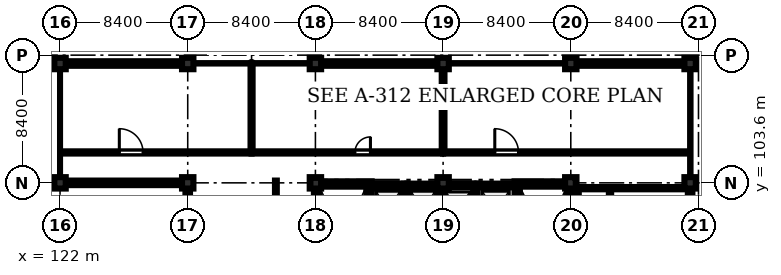
"""IFC4 building model, lengths in metres.
Left out: names, types, materials, properties, quantities, classifications, styles, units other than length and angle.
Written with IfcOpenShell. Run it as: python <this file> out.ifc"""

import sys

from ifc_helpers import new_model, si_unit, direction, frame, frame_2d, origin, origin_2d, place, context, subcontext, project, spatial, rectangle, extrude, element, fill, save


model = new_model("IFC4")
c1 = context("Model", 3, precision=1e-05, world=origin(), true_north=direction((0.0, 1.0)))
c2 = subcontext(c1, "Body", "Model", "MODEL_VIEW")
j1 = project(units=[si_unit("LENGTHUNIT", "METRE"), si_unit("PLANEANGLEUNIT", "RADIAN")], contexts=[c1])
p1 = place(None, origin())
s1 = spatial("IfcSite", under=j1, at=p1, CompositionType="ELEMENT")
p2 = place(p1, origin())
s2 = spatial("IfcBuilding", under=s1, at=p2, CompositionType="ELEMENT")
p3 = place(p2, frame((0.0, 0.0, 40.2)))
s3 = spatial("IfcBuildingStorey", under=s2, at=p3, CompositionType="ELEMENT", Elevation=40.2)
for number, where, z_axis, x_axis in (
    (1, (122.0, 103.6, 0.0), (0.0, 0.0, 1.0), (1.0, 0.0, 0.0)),
    (2, (122.0, 111.45, 0.0), (0.0, 0.0, 1.0), (1.0, 0.0, 0.0)),
    (3, (130.4, 103.6, 0.0), (0.0, 0.0, 1.0), (1.0, 0.0, 0.0)),
    (4, (130.4, 111.45, 0.0), (0.0, 0.0, 1.0), (1.0, 0.0, 0.0)),
    (5, (138.8, 103.6, 0.0), (0.0, 0.0, 1.0), (1.0, 0.0, 0.0)),
    (6, (138.8, 111.45, 0.0), (0.0, 0.0, 1.0), (1.0, 0.0, 0.0)),
    (7, (147.2, 103.6, 0.0), (0.0, 0.0, 1.0), (1.0, 0.0, 0.0)),
    (8, (147.2, 111.45, 0.0), (0.0, 0.0, 1.0), (1.0, 0.0, 0.0)),
    (9, (155.6, 103.6, 0.0), (0.0, 0.0, 1.0), (1.0, 0.0, 0.0)),
    (10, (155.6, 111.45, 0.0), (0.0, 0.0, 1.0), (1.0, 0.0, 0.0)),
    (11, (163.45, 103.6, 0.0), (0.0, 0.0, 1.0), (1.0, 0.0, 0.0)),
    (12, (163.45, 111.45, 0.0), (0.0, 0.0, 1.0), (1.0, 0.0, 0.0)),
):
    element("IfcColumn", number, at=place(p3, frame(where, z_axis=z_axis, x_axis=x_axis)), inside=s3, PredefinedType="COLUMN", context=c2, shape_type="SweptSolid", body=[
        extrude(rectangle(XDim=0.75, YDim=0.75, at=origin_2d()), origin(), (0.0, 0.0, 1.0), 4.0),
    ])
p4 = place(p3, frame((138.7, 103.525, 0.0), z_axis=(0.0, 0.0, 1.0), x_axis=(1.0, 0.0, 0.0)))
e13 = element("IfcWall", 13, at=p4, inside=s3, PredefinedType="SHEAR", context=c2, shape_type="SweptSolid", body=[
    extrude(rectangle(XDim=3.8, YDim=0.35, at=frame_2d((1.9, 0.0))), origin(), (0.0, 0.0, 1.0), 4.0),
])
p5 = place(p3, frame((138.875, 95.45, 0.0), z_axis=(0.0, 0.0, 1.0), x_axis=(0.0, 1.0, 0.0)))
e14 = element("IfcWall", 14, at=p5, inside=s3, PredefinedType="SHEAR", context=c2, shape_type="SweptSolid", body=[
    extrude(rectangle(XDim=7.9, YDim=0.35, at=frame_2d((3.95, 0.0))), origin(), (0.0, 0.0, 1.0), 4.0),
])
p6 = place(p3, frame((142.325, 95.45, 0.0), z_axis=(0.0, 0.0, 1.0), x_axis=(0.0, 1.0, 0.0)))
e15 = element("IfcWall", 15, at=p6, inside=s3, PredefinedType="SHEAR", context=c2, shape_type="SweptSolid", body=[
    extrude(rectangle(XDim=7.9, YDim=0.35, at=frame_2d((3.95, 0.0))), origin(), (0.0, 0.0, 1.0), 4.0),
])
p7 = place(p6, frame((0.22, 0.0, 0.0)))
e16 = element("IfcOpeningElement", 16, at=p7, cuts=e15, PredefinedType="OPENING", context=c2, shape_type="SweptSolid", body=[
    extrude(rectangle(XDim=1.15, YDim=2.15, at=frame_2d((0.575, 1.075))), frame((0.0, 0.185, 0.0), z_axis=(0.0, -1.0, 0.0), x_axis=(1.0, 0.0, 0.0)), (0.0, 0.0, 1.0), 0.37),
])
p8 = place(p3, frame((151.9, 103.525, 0.0), z_axis=(0.0, 0.0, 1.0), x_axis=(1.0, 0.0, 0.0)))
e17 = element("IfcWall", 17, at=p8, inside=s3, PredefinedType="SHEAR", context=c2, shape_type="SweptSolid", body=[
    extrude(rectangle(XDim=3.8, YDim=0.35, at=frame_2d((1.9, 0.0))), origin(), (0.0, 0.0, 1.0), 4.0),
])
p9 = place(p3, frame((152.075, 95.45, 0.0), z_axis=(0.0, 0.0, 1.0), x_axis=(0.0, 1.0, 0.0)))
e18 = element("IfcWall", 18, at=p9, inside=s3, PredefinedType="SHEAR", context=c2, shape_type="SweptSolid", body=[
    extrude(rectangle(XDim=7.9, YDim=0.35, at=frame_2d((3.95, 0.0))), origin(), (0.0, 0.0, 1.0), 4.0),
])
p10 = place(p9, frame((0.35, 0.0, 0.0)))
e19 = element("IfcOpeningElement", 19, at=p10, cuts=e18, PredefinedType="OPENING", context=c2, shape_type="SweptSolid", body=[
    extrude(rectangle(XDim=1.15, YDim=2.15, at=frame_2d((0.575, 1.075))), frame((0.0, 0.185, 0.0), z_axis=(0.0, -1.0, 0.0), x_axis=(1.0, 0.0, 0.0)), (0.0, 0.0, 1.0), 0.37),
])
p11 = place(p3, frame((155.525, 95.45, 0.0), z_axis=(0.0, 0.0, 1.0), x_axis=(0.0, 1.0, 0.0)))
e20 = element("IfcWall", 20, at=p11, inside=s3, PredefinedType="SHEAR", context=c2, shape_type="SweptSolid", body=[
    extrude(rectangle(XDim=7.9, YDim=0.35, at=frame_2d((3.95, 0.0))), origin(), (0.0, 0.0, 1.0), 4.0),
])
p12 = place(p3, frame((142.5, 103.425, 0.0), z_axis=(0.0, 0.0, 1.0), x_axis=(1.0, 0.0, 0.0)))
e21 = element("IfcWall", 21, at=p12, inside=s3, PredefinedType="SHEAR", context=c2, shape_type="SweptSolid", body=[
    extrude(rectangle(XDim=2.1, YDim=0.25, at=frame_2d((1.05, 0.0))), origin(), (0.0, 0.0, 1.0), 4.0),
])
p13 = place(p3, frame((144.725, 100.15, 0.0), z_axis=(0.0, 0.0, 1.0), x_axis=(0.0, 1.0, 0.0)))
e22 = element("IfcWall", 22, at=p13, inside=s3, PredefinedType="SHEAR", context=c2, shape_type="SweptSolid", body=[
    extrude(rectangle(XDim=3.4, YDim=0.25, at=frame_2d((1.7, 0.0))), origin(), (0.0, 0.0, 1.0), 4.0),
])
p14 = place(p3, frame((144.85, 103.425, 0.0), z_axis=(0.0, 0.0, 1.0), x_axis=(1.0, 0.0, 0.0)))
e23 = element("IfcWall", 23, at=p14, inside=s3, PredefinedType="SHEAR", context=c2, shape_type="SweptSolid", body=[
    extrude(rectangle(XDim=2.05, YDim=0.25, at=frame_2d((1.025, 0.0))), origin(), (0.0, 0.0, 1.0), 4.0),
])
p15 = place(p3, frame((147.025, 100.15, 0.0), z_axis=(0.0, 0.0, 1.0), x_axis=(0.0, 1.0, 0.0)))
e24 = element("IfcWall", 24, at=p15, inside=s3, PredefinedType="SHEAR", context=c2, shape_type="SweptSolid", body=[
    extrude(rectangle(XDim=3.4, YDim=0.25, at=frame_2d((1.7, 0.0))), origin(), (0.0, 0.0, 1.0), 4.0),
])
p16 = place(p3, frame((147.15, 103.425, 0.0), z_axis=(0.0, 0.0, 1.0), x_axis=(1.0, 0.0, 0.0)))
e25 = element("IfcWall", 25, at=p16, inside=s3, PredefinedType="SHEAR", context=c2, shape_type="SweptSolid", body=[
    extrude(rectangle(XDim=2.05, YDim=0.25, at=frame_2d((1.025, 0.0))), origin(), (0.0, 0.0, 1.0), 4.0),
])
p17 = place(p3, frame((149.325, 100.35, 0.0), z_axis=(0.0, 0.0, 1.0), x_axis=(0.0, 1.0, 0.0)))
e26 = element("IfcWall", 26, at=p17, inside=s3, PredefinedType="SHEAR", context=c2, shape_type="SweptSolid", body=[
    extrude(rectangle(XDim=3.2, YDim=0.25, at=frame_2d((1.6, 0.0))), origin(), (0.0, 0.0, 1.0), 4.0),
])
p18 = place(p3, frame((149.45, 103.425, 0.0), z_axis=(0.0, 0.0, 1.0), x_axis=(1.0, 0.0, 0.0)))
e27 = element("IfcWall", 27, at=p18, inside=s3, PredefinedType="SHEAR", context=c2, shape_type="SweptSolid", body=[
    extrude(rectangle(XDim=2.45, YDim=0.25, at=frame_2d((1.225, 0.0))), origin(), (0.0, 0.0, 1.0), 4.0),
])
p19 = place(p3, frame((122.375, 111.45, 0.0), z_axis=(0.0, 0.0, 1.0), x_axis=(1.0, 0.0, 0.0)))
e28 = element("IfcWall", 28, at=p19, inside=s3, PredefinedType="STANDARD", context=c2, shape_type="SweptSolid", body=[
    extrude(rectangle(XDim=7.65, YDim=0.3, at=frame_2d((3.825, 0.0))), origin(), (0.0, 0.0, 1.0), 3.3),
])
p20 = place(p19, frame((0.85, 0.0, 0.9)))
e29 = element("IfcOpeningElement", 29, at=p20, cuts=e28, PredefinedType="OPENING", context=c2, shape_type="SweptSolid", body=[
    extrude(rectangle(XDim=1.8, YDim=2.1, at=frame_2d((0.9, 1.05))), frame((0.0, 0.16, 0.0), z_axis=(0.0, -1.0, 0.0), x_axis=(1.0, 0.0, 0.0)), (0.0, 0.0, 1.0), 0.32),
])
p21 = place(p19, frame((4.65, 0.0, 0.9)))
e30 = element("IfcOpeningElement", 30, at=p21, cuts=e28, PredefinedType="OPENING", context=c2, shape_type="SweptSolid", body=[
    extrude(rectangle(XDim=1.8, YDim=2.1, at=frame_2d((0.9, 1.05))), frame((0.0, 0.16, 0.0), z_axis=(0.0, -1.0, 0.0), x_axis=(1.0, 0.0, 0.0)), (0.0, 0.0, 1.0), 0.32),
])
p22 = place(p3, frame((139.175, 111.45, 0.0), z_axis=(0.0, 0.0, 1.0), x_axis=(1.0, 0.0, 0.0)))
e31 = element("IfcWall", 31, at=p22, inside=s3, PredefinedType="STANDARD", context=c2, shape_type="SweptSolid", body=[
    extrude(rectangle(XDim=7.65, YDim=0.3, at=frame_2d((3.825, 0.0))), origin(), (0.0, 0.0, 1.0), 3.3),
])
p23 = place(p22, frame((0.85, 0.0, 0.9)))
e32 = element("IfcOpeningElement", 32, at=p23, cuts=e31, PredefinedType="OPENING", context=c2, shape_type="SweptSolid", body=[
    extrude(rectangle(XDim=1.8, YDim=2.1, at=frame_2d((0.9, 1.05))), frame((0.0, 0.16, 0.0), z_axis=(0.0, -1.0, 0.0), x_axis=(1.0, 0.0, 0.0)), (0.0, 0.0, 1.0), 0.32),
])
p24 = place(p22, frame((4.65, 0.0, 0.9)))
e33 = element("IfcOpeningElement", 33, at=p24, cuts=e31, PredefinedType="OPENING", context=c2, shape_type="SweptSolid", body=[
    extrude(rectangle(XDim=1.8, YDim=2.1, at=frame_2d((0.9, 1.05))), frame((0.0, 0.16, 0.0), z_axis=(0.0, -1.0, 0.0), x_axis=(1.0, 0.0, 0.0)), (0.0, 0.0, 1.0), 0.32),
])
p25 = place(p3, frame((155.975, 111.45, 0.0), z_axis=(0.0, 0.0, 1.0), x_axis=(1.0, 0.0, 0.0)))
e34 = element("IfcWall", 34, at=p25, inside=s3, PredefinedType="STANDARD", context=c2, shape_type="SweptSolid", body=[
    extrude(rectangle(XDim=7.1, YDim=0.3, at=frame_2d((3.55, 0.0))), origin(), (0.0, 0.0, 1.0), 3.3),
])
p26 = place(p25, frame((0.85, 0.0, 0.9)))
e35 = element("IfcOpeningElement", 35, at=p26, cuts=e34, PredefinedType="OPENING", context=c2, shape_type="SweptSolid", body=[
    extrude(rectangle(XDim=1.8, YDim=2.1, at=frame_2d((0.9, 1.05))), frame((0.0, 0.16, 0.0), z_axis=(0.0, -1.0, 0.0), x_axis=(1.0, 0.0, 0.0)), (0.0, 0.0, 1.0), 0.32),
])
p27 = place(p25, frame((4.65, 0.0, 0.9)))
e36 = element("IfcOpeningElement", 36, at=p27, cuts=e34, PredefinedType="OPENING", context=c2, shape_type="SweptSolid", body=[
    extrude(rectangle(XDim=1.8, YDim=2.1, at=frame_2d((0.9, 1.05))), frame((0.0, 0.16, 0.0), z_axis=(0.0, -1.0, 0.0), x_axis=(1.0, 0.0, 0.0)), (0.0, 0.0, 1.0), 0.32),
])
p28 = place(p3, frame((163.45, 103.225, 0.0), z_axis=(0.0, 0.0, 1.0), x_axis=(0.0, -1.0, 0.0)))
e37 = element("IfcWall", 37, at=p28, inside=s3, PredefinedType="STANDARD", context=c2, shape_type="SweptSolid", body=[
    extrude(rectangle(XDim=7.65, YDim=0.3, at=frame_2d((3.825, 0.0))), origin(), (0.0, 0.0, 1.0), 3.3),
])
p29 = place(p28, frame((1.15, 0.0, 1.1)))
e38 = element("IfcOpeningElement", 38, at=p29, cuts=e37, PredefinedType="OPENING", context=c2, shape_type="SweptSolid", body=[
    extrude(rectangle(XDim=1.4, YDim=1.4, at=frame_2d((0.7, 0.7))), frame((0.0, 0.16, 0.0), z_axis=(0.0, -1.0, 0.0), x_axis=(1.0, 0.0, 0.0)), (0.0, 0.0, 1.0), 0.32),
])
p30 = place(p3, frame((130.4, 95.575, 0.0), z_axis=(0.0, 0.0, 1.0), x_axis=(0.0, 1.0, 0.0)))
e39 = element("IfcWall", 39, at=p30, inside=s3, PredefinedType="STANDARD", context=c2, shape_type="SweptSolid", body=[
    extrude(rectangle(XDim=7.65, YDim=0.3, at=frame_2d((3.825, 0.0))), origin(), (0.0, 0.0, 1.0), 3.3),
])
p31 = place(p30, frame((2.4, 0.0, 1.0)))
e40 = element("IfcOpeningElement", 40, at=p31, cuts=e39, PredefinedType="OPENING", context=c2, shape_type="SweptSolid", body=[
    extrude(rectangle(XDim=1.8, YDim=1.8, at=frame_2d((0.9, 0.9))), frame((0.0, 0.16, 0.0), z_axis=(0.0, -1.0, 0.0), x_axis=(1.0, 0.0, 0.0)), (0.0, 0.0, 1.0), 0.32),
])
p32 = place(p3, frame((130.025, 103.6, 0.0), z_axis=(0.0, 0.0, 1.0), x_axis=(-1.0, 0.0, 0.0)))
e41 = element("IfcWall", 41, at=p32, inside=s3, PredefinedType="STANDARD", context=c2, shape_type="SweptSolid", body=[
    extrude(rectangle(XDim=7.65, YDim=0.3, at=frame_2d((3.825, 0.0))), origin(), (0.0, 0.0, 1.0), 3.3),
])
p33 = place(p3, frame((158.18, 94.68, 0.0), z_axis=(0.0, 0.0, 1.0), x_axis=(0.0, 1.0, 0.0)))
e42 = element("IfcWall", 42, at=p33, inside=s3, PredefinedType="PARTITIONING", context=c2, shape_type="SweptSolid", body=[
    extrude(rectangle(XDim=8.57, YDim=0.15, at=frame_2d((4.285, 0.0))), origin(), (0.0, 0.0, 1.0), 4.0),
])
p34 = place(p33, frame((0.8, 0.0, 0.0)))
e43 = element("IfcOpeningElement", 43, at=p34, cuts=e42, PredefinedType="OPENING", context=c2, shape_type="SweptSolid", body=[
    extrude(rectangle(XDim=1.0, YDim=2.12, at=frame_2d((0.5, 1.06))), frame((0.0, 0.085, 0.0), z_axis=(0.0, -1.0, 0.0), x_axis=(1.0, 0.0, 0.0)), (0.0, 0.0, 1.0), 0.17),
])
p35 = place(p33, frame((3.5, 0.0, 0.0)))
e44 = element("IfcOpeningElement", 44, at=p35, cuts=e42, PredefinedType="OPENING", context=c2, shape_type="SweptSolid", body=[
    extrude(rectangle(XDim=0.92, YDim=2.1, at=frame_2d((0.46, 1.05))), frame((0.0, 0.085, 0.0), z_axis=(0.0, -1.0, 0.0), x_axis=(1.0, 0.0, 0.0)), (0.0, 0.0, 1.0), 0.17),
])
p36 = place(p33, frame((6.4, 0.0, 0.0)))
e45 = element("IfcOpeningElement", 45, at=p36, cuts=e42, PredefinedType="OPENING", context=c2, shape_type="SweptSolid", body=[
    extrude(rectangle(XDim=0.92, YDim=2.1, at=frame_2d((0.46, 1.05))), frame((0.0, 0.085, 0.0), z_axis=(0.0, -1.0, 0.0), x_axis=(1.0, 0.0, 0.0)), (0.0, 0.0, 1.0), 0.17),
])
p37 = place(p3, frame((156.05, 103.25, 0.0), z_axis=(0.0, 0.0, 1.0), x_axis=(1.0, 0.0, 0.0)))
e46 = element("IfcWall", 46, at=p37, inside=s3, PredefinedType="PARTITIONING", context=c2, shape_type="SweptSolid", body=[
    extrude(rectangle(XDim=7.15, YDim=0.15, at=frame_2d((3.575, 0.0))), origin(), (0.0, 0.0, 1.0), 4.0),
])
p38 = place(p3, frame((156.05, 94.68, 0.0), z_axis=(0.0, 0.0, 1.0), x_axis=(0.0, 1.0, 0.0)))
e47 = element("IfcWall", 47, at=p38, inside=s3, PredefinedType="PARTITIONING", context=c2, shape_type="SweptSolid", body=[
    extrude(rectangle(XDim=8.57, YDim=0.15, at=frame_2d((4.285, 0.0))), origin(), (0.0, 0.0, 1.0), 4.0),
])
p39 = place(p3, frame((136.2, 94.68, 0.0), z_axis=(0.0, 0.0, 1.0), x_axis=(0.0, 1.0, 0.0)))
e48 = element("IfcWall", 48, at=p39, inside=s3, PredefinedType="PARTITIONING", context=c2, shape_type="SweptSolid", body=[
    extrude(rectangle(XDim=9.07, YDim=0.12, at=frame_2d((4.535, 0.0))), origin(), (0.0, 0.0, 1.0), 4.0),
])
p40 = place(p3, frame((122.15, 105.6, 0.0), z_axis=(0.0, 0.0, 1.0), x_axis=(1.0, 0.0, 0.0)))
e49 = element("IfcWall", 49, at=p40, inside=s3, PredefinedType="PARTITIONING", context=c2, shape_type="SweptSolid", body=[
    extrude(rectangle(XDim=12.45, YDim=0.145, at=frame_2d((6.225, 0.0))), origin(), (0.0, 0.0, 1.0), 4.0),
])
p41 = place(p40, frame((3.75, 0.0, 0.0)))
e50 = element("IfcOpeningElement", 50, at=p41, cuts=e49, PredefinedType="OPENING", context=c2, shape_type="SweptSolid", body=[
    extrude(rectangle(XDim=1.56, YDim=2.22, at=frame_2d((0.78, 1.11))), frame((0.0, 0.083, 0.0), z_axis=(0.0, -1.0, 0.0), x_axis=(1.0, 0.0, 0.0)), (0.0, 0.0, 1.0), 0.165),
])
p42 = place(p3, frame((134.6, 105.6, 0.0), z_axis=(0.0, 0.0, 1.0), x_axis=(1.0, 0.0, 0.0)))
e51 = element("IfcWall", 51, at=p42, inside=s3, PredefinedType="PARTITIONING", context=c2, shape_type="SweptSolid", body=[
    extrude(rectangle(XDim=12.6, YDim=0.145, at=frame_2d((6.3, 0.0))), origin(), (0.0, 0.0, 1.0), 4.0),
])
p43 = place(p42, frame((6.8, 0.0, 0.0)))
e52 = element("IfcOpeningElement", 52, at=p43, cuts=e51, PredefinedType="OPENING", context=c2, shape_type="SweptSolid", body=[
    extrude(rectangle(XDim=1.02, YDim=2.15, at=frame_2d((0.51, 1.075))), frame((0.0, 0.083, 0.0), z_axis=(0.0, -1.0, 0.0), x_axis=(1.0, 0.0, 0.0)), (0.0, 0.0, 1.0), 0.165),
])
p44 = place(p3, frame((134.6, 105.6, 0.0), z_axis=(0.0, 0.0, 1.0), x_axis=(0.0, 1.0, 0.0)))
e53 = element("IfcWall", 53, at=p44, inside=s3, PredefinedType="PARTITIONING", context=c2, shape_type="SweptSolid", body=[
    extrude(rectangle(XDim=5.75, YDim=0.135, at=frame_2d((2.875, 0.0))), origin(), (0.0, 0.0, 1.0), 3.55),
])
p45 = place(p3, frame((147.2, 105.6, 0.0), z_axis=(0.0, 0.0, 1.0), x_axis=(1.0, 0.0, 0.0)))
e54 = element("IfcWall", 54, at=p45, inside=s3, PredefinedType="PARTITIONING", context=c2, shape_type="SweptSolid", body=[
    extrude(rectangle(XDim=16.15, YDim=0.145, at=frame_2d((8.075, 0.0))), origin(), (0.0, 0.0, 1.0), 4.0),
])
p46 = place(p45, frame((3.4, 0.0, 0.0)))
e55 = element("IfcOpeningElement", 55, at=p46, cuts=e54, PredefinedType="OPENING", context=c2, shape_type="SweptSolid", body=[
    extrude(rectangle(XDim=1.56, YDim=2.22, at=frame_2d((0.78, 1.11))), frame((0.0, 0.083, 0.0), z_axis=(0.0, -1.0, 0.0), x_axis=(1.0, 0.0, 0.0)), (0.0, 0.0, 1.0), 0.165),
])
p47 = place(p3, frame((147.2, 105.6, 0.0), z_axis=(0.0, 0.0, 1.0), x_axis=(0.0, 1.0, 0.0)))
e56 = element("IfcWall", 56, at=p47, inside=s3, PredefinedType="STANDARD", context=c2, shape_type="SweptSolid", body=[
    extrude(rectangle(XDim=5.75, YDim=0.18, at=frame_2d((2.875, 0.0))), origin(), (0.0, 0.0, 1.0), 3.3),
])
p48 = place(p20, origin())
e57 = element("IfcWindow", 57, at=p48, inside=s3, PartitioningType="DOUBLE_PANEL_VERTICAL", PredefinedType="WINDOW", context=c2, shape_type="SweptSolid", body=[
    extrude(rectangle(XDim=1.8, YDim=2.1, at=frame_2d((0.9, 1.05))), frame((0.0, 0.03, 0.0), z_axis=(0.0, -1.0, 0.0), x_axis=(1.0, 0.0, 0.0)), (0.0, 0.0, 1.0), 0.06),
])
fill(e29, e57)
p49 = place(p21, origin())
e58 = element("IfcWindow", 58, at=p49, inside=s3, PartitioningType="DOUBLE_PANEL_VERTICAL", PredefinedType="WINDOW", context=c2, shape_type="SweptSolid", body=[
    extrude(rectangle(XDim=1.8, YDim=2.1, at=frame_2d((0.9, 1.05))), frame((0.0, 0.03, 0.0), z_axis=(0.0, -1.0, 0.0), x_axis=(1.0, 0.0, 0.0)), (0.0, 0.0, 1.0), 0.06),
])
fill(e30, e58)
p50 = place(p23, origin())
e59 = element("IfcWindow", 59, at=p50, inside=s3, PartitioningType="DOUBLE_PANEL_VERTICAL", PredefinedType="WINDOW", context=c2, shape_type="SweptSolid", body=[
    extrude(rectangle(XDim=1.8, YDim=2.1, at=frame_2d((0.9, 1.05))), frame((0.0, 0.03, 0.0), z_axis=(0.0, -1.0, 0.0), x_axis=(1.0, 0.0, 0.0)), (0.0, 0.0, 1.0), 0.06),
])
fill(e32, e59)
p51 = place(p24, origin())
e60 = element("IfcWindow", 60, at=p51, inside=s3, PartitioningType="DOUBLE_PANEL_VERTICAL", PredefinedType="WINDOW", context=c2, shape_type="SweptSolid", body=[
    extrude(rectangle(XDim=1.8, YDim=2.1, at=frame_2d((0.9, 1.05))), frame((0.0, 0.03, 0.0), z_axis=(0.0, -1.0, 0.0), x_axis=(1.0, 0.0, 0.0)), (0.0, 0.0, 1.0), 0.06),
])
fill(e33, e60)
p52 = place(p26, origin())
e61 = element("IfcWindow", 61, at=p52, inside=s3, PartitioningType="DOUBLE_PANEL_VERTICAL", PredefinedType="WINDOW", context=c2, shape_type="SweptSolid", body=[
    extrude(rectangle(XDim=1.8, YDim=2.1, at=frame_2d((0.9, 1.05))), frame((0.0, 0.03, 0.0), z_axis=(0.0, -1.0, 0.0), x_axis=(1.0, 0.0, 0.0)), (0.0, 0.0, 1.0), 0.06),
])
fill(e35, e61)
p53 = place(p27, origin())
e62 = element("IfcWindow", 62, at=p53, inside=s3, PartitioningType="DOUBLE_PANEL_VERTICAL", PredefinedType="WINDOW", context=c2, shape_type="SweptSolid", body=[
    extrude(rectangle(XDim=1.8, YDim=2.1, at=frame_2d((0.9, 1.05))), frame((0.0, 0.03, 0.0), z_axis=(0.0, -1.0, 0.0), x_axis=(1.0, 0.0, 0.0)), (0.0, 0.0, 1.0), 0.06),
])
fill(e36, e62)
p54 = place(p41, origin())
e63 = element("IfcDoor", 63, at=p54, inside=s3, OperationType="SINGLE_SWING_LEFT", PredefinedType="DOOR", context=c2, shape_type="SweptSolid", body=[
    extrude(rectangle(XDim=1.56, YDim=2.22, at=frame_2d((0.78, 1.11))), frame((0.0, 0.025, 0.0), z_axis=(0.0, -1.0, 0.0), x_axis=(1.0, 0.0, 0.0)), (0.0, 0.0, 1.0), 0.05),
])
fill(e50, e63)
p55 = place(p43, origin())
e64 = element("IfcDoor", 64, at=p55, inside=s3, OperationType="SINGLE_SWING_RIGHT", PredefinedType="DOOR", context=c2, shape_type="SweptSolid", body=[
    extrude(rectangle(XDim=1.02, YDim=2.15, at=frame_2d((0.51, 1.075))), frame((0.0, 0.025, 0.0), z_axis=(0.0, -1.0, 0.0), x_axis=(1.0, 0.0, 0.0)), (0.0, 0.0, 1.0), 0.05),
])
fill(e52, e64)
p56 = place(p46, origin())
e65 = element("IfcDoor", 65, at=p56, inside=s3, OperationType="SINGLE_SWING_LEFT", PredefinedType="DOOR", context=c2, shape_type="SweptSolid", body=[
    extrude(rectangle(XDim=1.56, YDim=2.22, at=frame_2d((0.78, 1.11))), frame((0.0, 0.025, 0.0), z_axis=(0.0, -1.0, 0.0), x_axis=(1.0, 0.0, 0.0)), (0.0, 0.0, 1.0), 0.05),
])
fill(e55, e65)
save(model, sys.argv[1])
